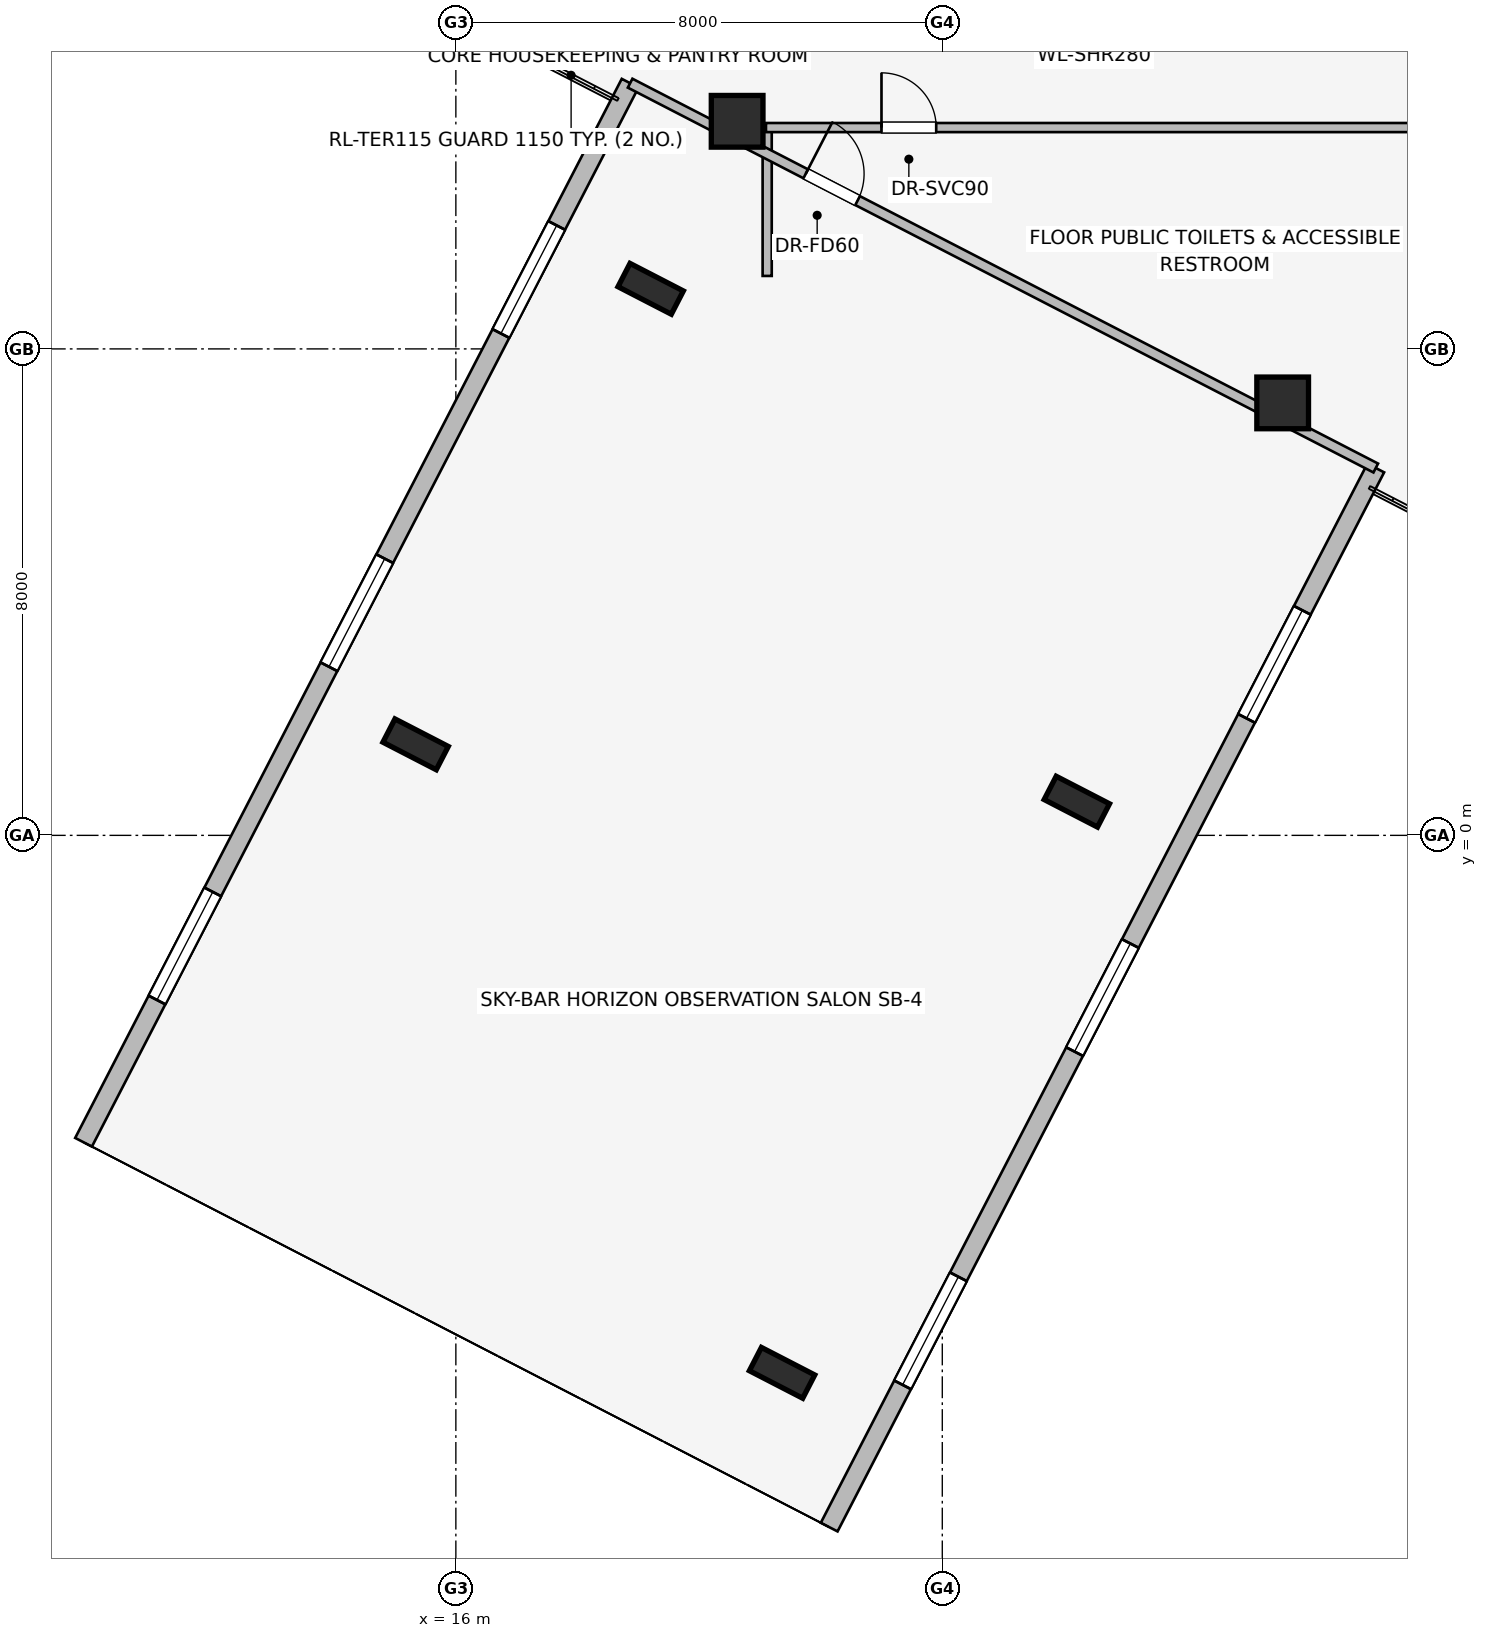
"""IFC4 building model, lengths in metres.
Left out: names, types, materials, properties, quantities, classifications, styles, units other than length and angle.
Written with IfcOpenShell. Run it as: python <this file> out.ifc"""

import sys

from ifc_helpers import new_model, si_unit, direction, frame, frame_2d, origin, origin_2d, place, context, subcontext, project, spatial, rectangle, i_section, extrude, element, fill, save


model = new_model("IFC4")
c1 = context("Model", 3, precision=1e-05, world=origin(), true_north=direction((0.0, 1.0)))
c2 = subcontext(c1, "Body", "Model", "MODEL_VIEW")
j1 = project(units=[si_unit("LENGTHUNIT", "METRE"), si_unit("PLANEANGLEUNIT", "RADIAN")], contexts=[c1])
p1 = place(None, origin())
s1 = spatial("IfcSite", under=j1, at=p1, CompositionType="ELEMENT")
p2 = place(p1, origin())
s2 = spatial("IfcBuilding", under=s1, at=p2, CompositionType="ELEMENT")
p3 = place(p2, frame((0.0, 0.0, 177.45)))
s3 = spatial("IfcBuildingStorey", under=s2, at=p3, CompositionType="ELEMENT", Elevation=177.45)
for number, where, z_axis, x_axis in (
    (1, (20.626, 11.743, 0.0), (0.0, 0.0, 1.0), (1.0, 0.0, 0.0)),
    (2, (29.598, 7.112, 0.0), (0.0, 0.0, 1.0), (1.0, 0.0, 0.0)),
):
    element("IfcColumn", number, at=place(p3, frame(where, z_axis=z_axis, x_axis=x_axis)), inside=s3, PredefinedType="COLUMN", context=c2, shape_type="SweptSolid", body=[
        extrude(rectangle(XDim=0.85, YDim=0.85, at=origin_2d()), origin(), (0.0, 0.0, 1.0), 3.45),
    ])
for number, where, z_axis, x_axis in (
    (3, (19.204, 8.988, 0.0), (0.0, 0.0, 1.0), (-0.459, -0.889, 0.0)),
    (4, (26.213, 0.554, 0.0), (0.0, 0.0, 1.0), (-0.459, -0.889, 0.0)),
    (5, (15.338, 1.497, 0.0), (0.0, 0.0, 1.0), (-0.459, -0.889, 0.0)),
    (6, (21.365, -8.839, 0.0), (0.0, 0.0, 1.0), (-0.459, -0.889, 0.0)),
):
    element("IfcColumn", number, at=place(p3, frame(where, z_axis=z_axis, x_axis=x_axis)), inside=s3, PredefinedType="COLUMN", context=c2, shape_type="SweptSolid", body=[
        extrude(i_section(OverallWidth=0.431, OverallDepth=0.987, WebThickness=0.034, FlangeThickness=0.062, at=origin_2d()), origin(), (0.0, 0.0, 1.0), 3.45),
    ])
p4 = place(p3, frame((17.489, 12.8, 0.0), z_axis=(0.0, 0.0, 1.0), x_axis=(-0.791409877269, 0.611285862884, 0.0)))
e7 = element("IfcWall", 7, at=p4, inside=s3, PredefinedType="STANDARD", context=c2, shape_type="SweptSolid", body=[
    extrude(rectangle(XDim=1.677, YDim=0.33, at=frame_2d((0.838, 0.0))), origin(), (0.0, 0.0, 1.0), 3.16),
])
p5 = place(p3, frame((9.877, -5.047, 0.0), z_axis=(0.0, 0.0, 1.0), x_axis=(0.458621661341, 0.888631628825, 0.0)))
e8 = element("IfcWall", 8, at=p5, inside=s3, PredefinedType="STANDARD", context=c2, shape_type="SweptSolid", body=[
    extrude(rectangle(XDim=19.6, YDim=0.31, at=frame_2d((9.8, 0.0))), origin(), (0.0, 0.0, 1.0), 3.16),
])
p6 = place(p5, frame((2.633, 0.0, 0.75)))
e9 = element("IfcOpeningElement", 9, at=p6, cuts=e8, PredefinedType="OPENING", context=c2, shape_type="SweptSolid", body=[
    extrude(rectangle(XDim=2.0, YDim=1.5, at=frame_2d((1.0, 0.75))), frame((0.0, 0.165, 0.0), z_axis=(0.0, -1.0, 0.0), x_axis=(1.0, 0.0, 0.0)), (0.0, 0.0, 1.0), 0.33),
])
p7 = place(p5, frame((8.8, 0.0, 0.75)))
e10 = element("IfcOpeningElement", 10, at=p7, cuts=e8, PredefinedType="OPENING", context=c2, shape_type="SweptSolid", body=[
    extrude(rectangle(XDim=2.0, YDim=1.5, at=frame_2d((1.0, 0.75))), frame((0.0, 0.165, 0.0), z_axis=(0.0, -1.0, 0.0), x_axis=(1.0, 0.0, 0.0)), (0.0, 0.0, 1.0), 0.33),
])
p8 = place(p5, frame((14.967, 0.0, 0.75)))
e11 = element("IfcOpeningElement", 11, at=p8, cuts=e8, PredefinedType="OPENING", context=c2, shape_type="SweptSolid", body=[
    extrude(rectangle(XDim=2.0, YDim=1.5, at=frame_2d((1.0, 0.75))), frame((0.0, 0.165, 0.0), z_axis=(0.0, -1.0, 0.0), x_axis=(1.0, 0.0, 0.0)), (0.0, 0.0, 1.0), 0.33),
])
p9 = place(p3, frame((31.129, 6.041, 0.0), z_axis=(0.0, 0.0, 1.0), x_axis=(-0.458626737826, -0.88862900884, 0.0)))
e12 = element("IfcWall", 12, at=p9, inside=s3, PredefinedType="STANDARD", context=c2, shape_type="SweptSolid", body=[
    extrude(rectangle(XDim=19.6, YDim=0.31, at=frame_2d((9.8, 0.0))), origin(), (0.0, 0.0, 1.0), 3.16),
])
p10 = place(p9, frame((2.633, 0.0, 0.75)))
e13 = element("IfcOpeningElement", 13, at=p10, cuts=e12, PredefinedType="OPENING", context=c2, shape_type="SweptSolid", body=[
    extrude(rectangle(XDim=2.0, YDim=1.5, at=frame_2d((1.0, 0.75))), frame((0.0, 0.165, 0.0), z_axis=(0.0, -1.0, 0.0), x_axis=(1.0, 0.0, 0.0)), (0.0, 0.0, 1.0), 0.33),
])
p11 = place(p9, frame((8.8, 0.0, 0.75)))
e14 = element("IfcOpeningElement", 14, at=p11, cuts=e12, PredefinedType="OPENING", context=c2, shape_type="SweptSolid", body=[
    extrude(rectangle(XDim=2.0, YDim=1.5, at=frame_2d((1.0, 0.75))), frame((0.0, 0.165, 0.0), z_axis=(0.0, -1.0, 0.0), x_axis=(1.0, 0.0, 0.0)), (0.0, 0.0, 1.0), 0.33),
])
p12 = place(p9, frame((14.967, 0.0, 0.75)))
e15 = element("IfcOpeningElement", 15, at=p12, cuts=e12, PredefinedType="OPENING", context=c2, shape_type="SweptSolid", body=[
    extrude(rectangle(XDim=2.0, YDim=1.5, at=frame_2d((1.0, 0.75))), frame((0.0, 0.165, 0.0), z_axis=(0.0, -1.0, 0.0), x_axis=(1.0, 0.0, 0.0)), (0.0, 0.0, 1.0), 0.33),
])
p13 = place(p3, frame((21.12, 9.2, 0.0), z_axis=(0.0, 0.0, 1.0), x_axis=(0.0, 1.0, 0.0)))
e16 = element("IfcWall", 16, at=p13, inside=s3, PredefinedType="PARTITIONING", context=c2, shape_type="SweptSolid", body=[
    extrude(rectangle(XDim=2.48, YDim=0.15, at=frame_2d((1.24, 0.0))), origin(), (0.0, 0.0, 1.0), 3.16),
])
p14 = place(p3, frame((21.1, 11.64, 0.0), z_axis=(0.0, 0.0, 1.0), x_axis=(1.0, 0.0, 0.0)))
e17 = element("IfcWall", 17, at=p14, inside=s3, PredefinedType="PARTITIONING", context=c2, shape_type="SweptSolid", body=[
    extrude(rectangle(XDim=11.75, YDim=0.15, at=frame_2d((5.875, 0.0))), origin(), (0.0, 0.0, 1.0), 3.16),
])
p15 = place(p14, frame((1.9, 0.0, 0.0)))
e18 = element("IfcOpeningElement", 18, at=p15, cuts=e17, PredefinedType="OPENING", context=c2, shape_type="SweptSolid", body=[
    extrude(rectangle(XDim=0.9, YDim=2.0, at=frame_2d((0.45, 1.0))), frame((0.0, 0.085, 0.0), z_axis=(0.0, -1.0, 0.0), x_axis=(1.0, 0.0, 0.0)), (0.0, 0.0, 1.0), 0.17),
])
p16 = place(p3, frame((18.866, 12.37, 0.0), z_axis=(0.0, 0.0, 1.0), x_axis=(0.888625308836, -0.458633906832, 0.0)))
e19 = element("IfcWall", 19, at=p16, inside=s3, PredefinedType="PARTITIONING", context=c2, shape_type="SweptSolid", body=[
    extrude(rectangle(XDim=13.8, YDim=0.165, at=frame_2d((6.9, 0.0))), origin(), (0.0, 0.0, 1.0), 2.611),
])
p17 = place(p16, frame((3.25, 0.0, 0.0)))
e20 = element("IfcOpeningElement", 20, at=p17, cuts=e19, PredefinedType="OPENING", context=c2, shape_type="SweptSolid", body=[
    extrude(rectangle(XDim=0.96, YDim=2.0, at=frame_2d((0.48, 1.0))), frame((0.0, 0.093, 0.0), z_axis=(0.0, -1.0, 0.0), x_axis=(1.0, 0.0, 0.0)), (0.0, 0.0, 1.0), 0.185),
])
p18 = place(p6, origin())
e21 = element("IfcWindow", 21, at=p18, inside=s3, PartitioningType="SINGLE_PANEL", PredefinedType="WINDOW", context=c2, shape_type="SweptSolid", body=[
    extrude(rectangle(XDim=2.0, YDim=1.5, at=frame_2d((1.0, 0.75))), frame((0.0, 0.03, 0.0), z_axis=(0.0, -1.0, 0.0), x_axis=(1.0, 0.0, 0.0)), (0.0, 0.0, 1.0), 0.06),
])
fill(e9, e21)
p19 = place(p7, origin())
e22 = element("IfcWindow", 22, at=p19, inside=s3, PartitioningType="SINGLE_PANEL", PredefinedType="WINDOW", context=c2, shape_type="SweptSolid", body=[
    extrude(rectangle(XDim=2.0, YDim=1.5, at=frame_2d((1.0, 0.75))), frame((0.0, 0.03, 0.0), z_axis=(0.0, -1.0, 0.0), x_axis=(1.0, 0.0, 0.0)), (0.0, 0.0, 1.0), 0.06),
])
fill(e10, e22)
p20 = place(p8, origin())
e23 = element("IfcWindow", 23, at=p20, inside=s3, PartitioningType="SINGLE_PANEL", PredefinedType="WINDOW", context=c2, shape_type="SweptSolid", body=[
    extrude(rectangle(XDim=2.0, YDim=1.5, at=frame_2d((1.0, 0.75))), frame((0.0, 0.03, 0.0), z_axis=(0.0, -1.0, 0.0), x_axis=(1.0, 0.0, 0.0)), (0.0, 0.0, 1.0), 0.06),
])
fill(e11, e23)
p21 = place(p10, origin())
e24 = element("IfcWindow", 24, at=p21, inside=s3, PartitioningType="SINGLE_PANEL", PredefinedType="WINDOW", context=c2, shape_type="SweptSolid", body=[
    extrude(rectangle(XDim=2.0, YDim=1.5, at=frame_2d((1.0, 0.75))), frame((0.0, 0.03, 0.0), z_axis=(0.0, -1.0, 0.0), x_axis=(1.0, 0.0, 0.0)), (0.0, 0.0, 1.0), 0.06),
])
fill(e13, e24)
p22 = place(p11, origin())
e25 = element("IfcWindow", 25, at=p22, inside=s3, PartitioningType="SINGLE_PANEL", PredefinedType="WINDOW", context=c2, shape_type="SweptSolid", body=[
    extrude(rectangle(XDim=2.0, YDim=1.5, at=frame_2d((1.0, 0.75))), frame((0.0, 0.03, 0.0), z_axis=(0.0, -1.0, 0.0), x_axis=(1.0, 0.0, 0.0)), (0.0, 0.0, 1.0), 0.06),
])
fill(e14, e25)
p23 = place(p12, origin())
e26 = element("IfcWindow", 26, at=p23, inside=s3, PartitioningType="SINGLE_PANEL", PredefinedType="WINDOW", context=c2, shape_type="SweptSolid", body=[
    extrude(rectangle(XDim=2.0, YDim=1.5, at=frame_2d((1.0, 0.75))), frame((0.0, 0.03, 0.0), z_axis=(0.0, -1.0, 0.0), x_axis=(1.0, 0.0, 0.0)), (0.0, 0.0, 1.0), 0.06),
])
fill(e15, e26)
p24 = place(p15, origin())
e27 = element("IfcDoor", 27, at=p24, inside=s3, OperationType="SINGLE_SWING_LEFT", PredefinedType="DOOR", context=c2, shape_type="SweptSolid", body=[
    extrude(rectangle(XDim=0.9, YDim=2.0, at=frame_2d((0.45, 1.0))), frame((0.0, 0.025, 0.0), z_axis=(0.0, -1.0, 0.0), x_axis=(1.0, 0.0, 0.0)), (0.0, 0.0, 1.0), 0.05),
])
fill(e18, e27)
p25 = place(p17, origin())
e28 = element("IfcDoor", 28, at=p25, inside=s3, OperationType="SINGLE_SWING_LEFT", PredefinedType="DOOR", context=c2, shape_type="SweptSolid", body=[
    extrude(rectangle(XDim=0.96, YDim=2.0, at=frame_2d((0.48, 1.0))), frame((0.0, 0.025, 0.0), z_axis=(0.0, -1.0, 0.0), x_axis=(1.0, 0.0, 0.0)), (0.0, 0.0, 1.0), 0.05),
])
fill(e20, e28)
save(model, sys.argv[1])
